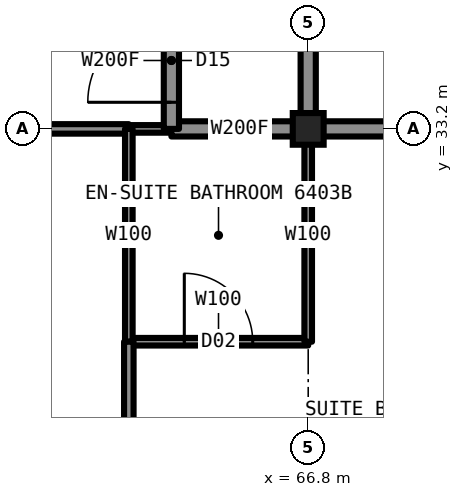
"""IFC4 building model, lengths in metres.
Left out: names, types, materials, properties, quantities, classifications, styles, units other than length and angle.
Written with IfcOpenShell. Run it as: python <this file> out.ifc"""

import sys

from ifc_helpers import new_model, si_unit, direction, frame, frame_2d, origin, origin_2d, place, context, subcontext, project, spatial, rectangle, i_section, extrude, element, fill, save


model = new_model("IFC4")
c1 = context("Model", 3, precision=1e-05, world=origin(), true_north=direction((0.0, 1.0)))
c2 = subcontext(c1, "Body", "Model", "MODEL_VIEW")
j1 = project(units=[si_unit("LENGTHUNIT", "METRE"), si_unit("PLANEANGLEUNIT", "RADIAN")], contexts=[c1])
p1 = place(None, origin())
s1 = spatial("IfcSite", under=j1, at=p1, CompositionType="ELEMENT")
p2 = place(p1, origin())
s2 = spatial("IfcBuilding", under=s1, at=p2, CompositionType="ELEMENT")
p3 = place(p2, frame((0.0, 0.0, 237.2)))
s3 = spatial("IfcBuildingStorey", under=s2, at=p3, CompositionType="ELEMENT", Elevation=237.2)
p4 = place(p3, frame((66.8, 33.2, 0.0), z_axis=(0.0, 0.0, 1.0), x_axis=(1.0, 0.0, 0.0)))
e1 = element("IfcColumn", 1, at=p4, inside=s3, PredefinedType="COLUMN", context=c2, shape_type="SweptSolid", body=[
    extrude(i_section(OverallWidth=0.406, OverallDepth=0.417, WebThickness=0.03, FlangeThickness=0.048, at=origin_2d()), origin(), (0.0, 0.0, 1.0), 3.5),
])
p5 = place(p3, frame((64.44, 33.2, 0.0), z_axis=(0.0, 0.0, 1.0), x_axis=(1.0, 0.0, 0.0)))
e2 = element("IfcWall", 2, at=p5, inside=s3, PredefinedType="PARTITIONING", context=c2, shape_type="SweptSolid", body=[
    extrude(rectangle(XDim=0.56, YDim=0.1, at=frame_2d((0.28, 0.0))), origin(), (0.0, 0.0, 1.0), 3.33),
])
p6 = place(p3, frame((65.0, 33.2, 0.0), z_axis=(0.0, 0.0, 1.0), x_axis=(1.0, 0.0, 0.0)))
e3 = element("IfcWall", 3, at=p6, inside=s3, PredefinedType="PARTITIONING", context=c2, shape_type="SweptSolid", body=[
    extrude(rectangle(XDim=1.8, YDim=0.2, at=frame_2d((0.9, 0.0))), origin(), (0.0, 0.0, 1.0), 3.33),
])
p7 = place(p3, frame((66.8, 33.2, 0.0), z_axis=(0.0, 0.0, 1.0), x_axis=(1.0, 0.0, 0.0)))
e4 = element("IfcWall", 4, at=p7, inside=s3, PredefinedType="PARTITIONING", context=c2, shape_type="SweptSolid", body=[
    extrude(rectangle(XDim=5.9, YDim=0.2, at=frame_2d((2.95, 0.0))), origin(), (0.0, 0.0, 1.0), 2.573),
])
p8 = place(p3, frame((56.6, 33.2, 0.0), z_axis=(0.0, 0.0, 1.0), x_axis=(1.0, 0.0, 0.0)))
e5 = element("IfcWall", 5, at=p8, inside=s3, PredefinedType="PARTITIONING", context=c2, shape_type="SweptSolid", body=[
    extrude(rectangle(XDim=7.84, YDim=0.125, at=frame_2d((3.92, 0.0))), origin(), (0.0, 0.0, 1.0), 3.33),
])
p9 = place(p8, frame((3.45, 0.0, 0.0)))
e6 = element("IfcOpeningElement", 6, at=p9, cuts=e5, PredefinedType="OPENING", context=c2, shape_type="SweptSolid", body=[
    extrude(rectangle(XDim=0.9, YDim=2.2, at=frame_2d((0.45, 1.1))), frame((0.0, 0.073, 0.0), z_axis=(0.0, -1.0, 0.0), x_axis=(1.0, 0.0, 0.0)), (0.0, 0.0, 1.0), 0.145),
])
p10 = place(p3, frame((64.44, 30.4, 0.0), z_axis=(0.0, 0.0, 1.0), x_axis=(1.0, 0.0, 0.0)))
e7 = element("IfcWall", 7, at=p10, inside=s3, PredefinedType="PARTITIONING", context=c2, shape_type="SweptSolid", body=[
    extrude(rectangle(XDim=2.36, YDim=0.1, at=frame_2d((1.18, 0.0))), origin(), (0.0, 0.0, 1.0), 3.33),
])
p11 = place(p10, frame((0.73, 0.0, 0.0)))
e8 = element("IfcOpeningElement", 8, at=p11, cuts=e7, PredefinedType="OPENING", context=c2, shape_type="SweptSolid", body=[
    extrude(rectangle(XDim=0.9, YDim=2.1, at=frame_2d((0.45, 1.05))), frame((0.0, 0.06, 0.0), z_axis=(0.0, -1.0, 0.0), x_axis=(1.0, 0.0, 0.0)), (0.0, 0.0, 1.0), 0.12),
])
p12 = place(p3, frame((65.0, 33.2, 0.0), z_axis=(0.0, 0.0, 1.0), x_axis=(0.0, 1.0, 0.0)))
e9 = element("IfcWall", 9, at=p12, inside=s3, PredefinedType="PARTITIONING", context=c2, shape_type="SweptSolid", body=[
    extrude(rectangle(XDim=1.8, YDim=0.2, at=frame_2d((0.9, 0.0))), origin(), (0.0, 0.0, 1.0), 3.33),
])
p13 = place(p12, frame((0.35, 0.0, 0.0)))
e10 = element("IfcOpeningElement", 10, at=p13, cuts=e9, PredefinedType="OPENING", context=c2, shape_type="SweptSolid", body=[
    extrude(rectangle(XDim=1.1, YDim=2.2, at=frame_2d((0.55, 1.1))), frame((0.0, 0.11, 0.0), z_axis=(0.0, -1.0, 0.0), x_axis=(1.0, 0.0, 0.0)), (0.0, 0.0, 1.0), 0.22),
])
p14 = place(p3, frame((66.8, 30.4, 0.0), z_axis=(0.0, 0.0, 1.0), x_axis=(0.0, 1.0, 0.0)))
e11 = element("IfcWall", 11, at=p14, inside=s3, PredefinedType="PARTITIONING", context=c2, shape_type="SweptSolid", body=[
    extrude(rectangle(XDim=2.8, YDim=0.1, at=frame_2d((1.4, 0.0))), origin(), (0.0, 0.0, 1.0), 2.573),
])
p15 = place(p3, frame((66.8, 33.2, 0.0), z_axis=(0.0, 0.0, 1.0), x_axis=(0.0, 1.0, 0.0)))
e12 = element("IfcWall", 12, at=p15, inside=s3, PredefinedType="PARTITIONING", context=c2, shape_type="SweptSolid", body=[
    extrude(rectangle(XDim=23.6, YDim=0.2, at=frame_2d((11.8, 0.0))), origin(), (0.0, 0.0, 1.0), 3.33),
])
p16 = place(p15, frame((8.85, 0.0, 0.0)))
e13 = element("IfcOpeningElement", 13, at=p16, cuts=e12, PredefinedType="OPENING", context=c2, shape_type="SweptSolid", body=[
    extrude(rectangle(XDim=1.1, YDim=2.2, at=frame_2d((0.55, 1.1))), frame((0.0, 0.11, 0.0), z_axis=(0.0, -1.0, 0.0), x_axis=(1.0, 0.0, 0.0)), (0.0, 0.0, 1.0), 0.22),
])
p17 = place(p15, frame((13.65, 0.0, 0.0)))
e14 = element("IfcOpeningElement", 14, at=p17, cuts=e12, PredefinedType="OPENING", context=c2, shape_type="SweptSolid", body=[
    extrude(rectangle(XDim=1.1, YDim=2.2, at=frame_2d((0.55, 1.1))), frame((0.0, 0.11, 0.0), z_axis=(0.0, -1.0, 0.0), x_axis=(1.0, 0.0, 0.0)), (0.0, 0.0, 1.0), 0.22),
])
p18 = place(p3, frame((64.44, 30.4, 0.0), z_axis=(0.0, 0.0, 1.0), x_axis=(0.0, 1.0, 0.0)))
e15 = element("IfcWall", 15, at=p18, inside=s3, PredefinedType="PARTITIONING", context=c2, shape_type="SweptSolid", body=[
    extrude(rectangle(XDim=2.8, YDim=0.1, at=frame_2d((1.4, 0.0))), origin(), (0.0, 0.0, 1.0), 3.33),
])
p19 = place(p3, frame((64.44, 27.3, 0.0), z_axis=(0.0, 0.0, 1.0), x_axis=(0.0, 1.0, 0.0)))
e16 = element("IfcWall", 16, at=p19, inside=s3, PredefinedType="PARTITIONING", context=c2, shape_type="SweptSolid", body=[
    extrude(rectangle(XDim=3.1, YDim=0.125, at=frame_2d((1.55, 0.0))), origin(), (0.0, 0.0, 1.0), 3.33),
])
p20 = place(p19, frame((0.95, 0.0, 0.0)))
e17 = element("IfcOpeningElement", 17, at=p20, cuts=e16, PredefinedType="OPENING", context=c2, shape_type="SweptSolid", body=[
    extrude(rectangle(XDim=0.9, YDim=2.2, at=frame_2d((0.45, 1.1))), frame((0.0, 0.073, 0.0), z_axis=(0.0, -1.0, 0.0), x_axis=(1.0, 0.0, 0.0)), (0.0, 0.0, 1.0), 0.145),
])
p21 = place(p11, origin())
e18 = element("IfcDoor", 18, at=p21, inside=s3, OperationType="SINGLE_SWING_RIGHT", PredefinedType="DOOR", context=c2, shape_type="SweptSolid", body=[
    extrude(rectangle(XDim=0.9, YDim=2.1, at=frame_2d((0.45, 1.05))), frame((0.0, 0.025, 0.0), z_axis=(0.0, -1.0, 0.0), x_axis=(1.0, 0.0, 0.0)), (0.0, 0.0, 1.0), 0.05),
])
fill(e8, e18)
p22 = place(p13, origin())
e19 = element("IfcDoor", 19, at=p22, inside=s3, OperationType="SINGLE_SWING_LEFT", PredefinedType="DOOR", context=c2, shape_type="SweptSolid", body=[
    extrude(rectangle(XDim=1.1, YDim=2.2, at=frame_2d((0.55, 1.1))), frame((0.0, 0.025, 0.0), z_axis=(0.0, -1.0, 0.0), x_axis=(1.0, 0.0, 0.0)), (0.0, 0.0, 1.0), 0.05),
])
fill(e10, e19)
save(model, sys.argv[1])
